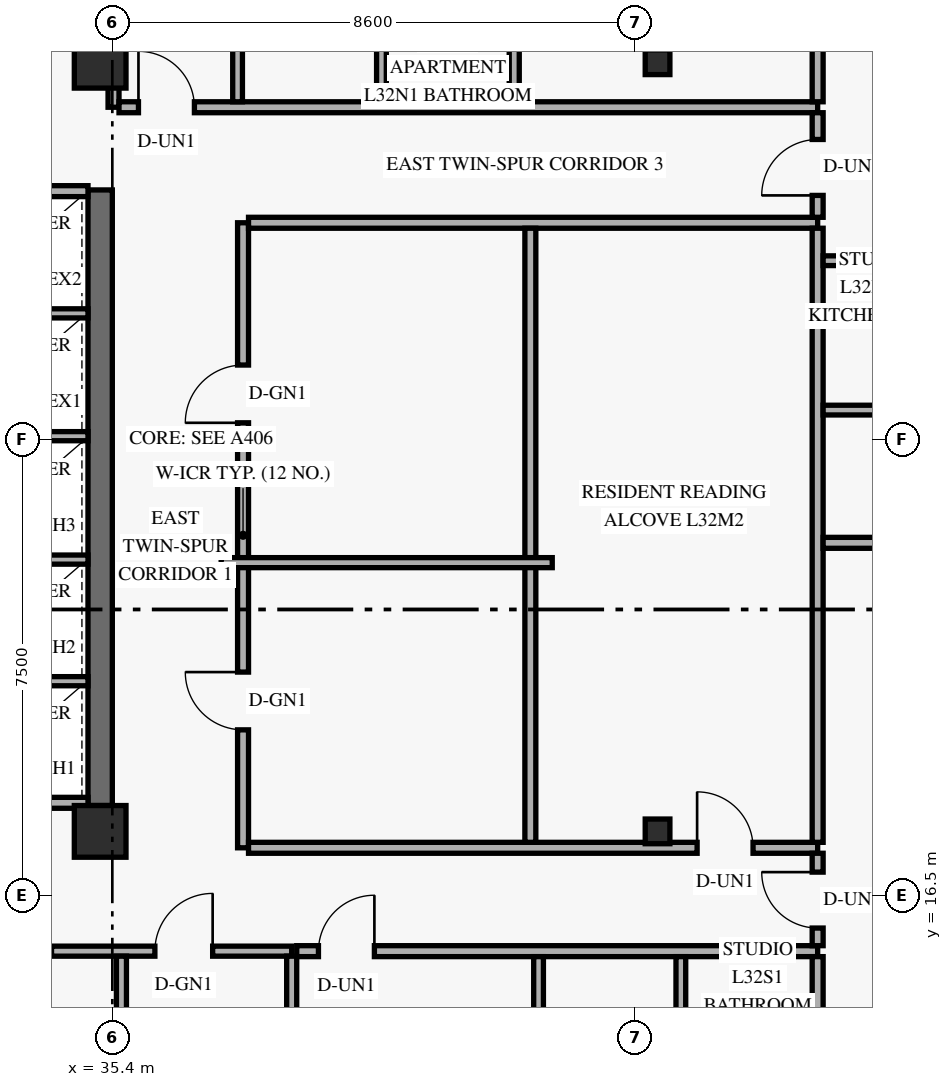
"""IFC4 building model, lengths in metres.
Left out: names, types, materials, properties, quantities, classifications, styles, units other than length and angle.
Written with IfcOpenShell. Run it as: python <this file> out.ifc"""

import sys

from ifc_helpers import new_model, si_unit, direction, frame, frame_2d, origin, origin_2d, place, context, subcontext, project, spatial, rectangle, hollow_rectangle, extrude, element, fill, save


model = new_model("IFC4")
c1 = context("Model", 3, precision=1e-05, world=origin(), true_north=direction((0.0, 1.0)))
c2 = subcontext(c1, "Body", "Model", "MODEL_VIEW")
j1 = project(units=[si_unit("LENGTHUNIT", "METRE"), si_unit("PLANEANGLEUNIT", "RADIAN")], contexts=[c1])
p1 = place(None, origin())
s1 = spatial("IfcSite", under=j1, at=p1, CompositionType="ELEMENT")
p2 = place(p1, origin())
s2 = spatial("IfcBuilding", under=s1, at=p2, CompositionType="ELEMENT")
p3 = place(p2, frame((0.0, 0.0, 124.8)))
s3 = spatial("IfcBuildingStorey", under=s2, at=p3, CompositionType="ELEMENT", Elevation=124.8)
p4 = place(p3, frame((35.2, 17.975, 0.0), z_axis=(0.0, 0.0, 1.0), x_axis=(0.0, 1.0, 0.0)))
e1 = element("IfcWall", 1, at=p4, inside=s3, PredefinedType="SHEAR", context=c2, shape_type="SweptSolid", body=[
    extrude(rectangle(XDim=10.125, YDim=0.4, at=frame_2d((5.062, 0.0))), origin(), (0.0, 0.0, 1.0), 2.749),
])
for number, where, z_axis, x_axis in (
    (2, (35.2, 17.55, 0.0), (0.0, 0.0, 1.0), (1.0, 0.0, 0.0)),
    (3, (35.2, 30.2, 0.0), (0.0, 0.0, 1.0), (1.0, 0.0, 0.0)),
):
    element("IfcColumn", number, at=place(p3, frame(where, z_axis=z_axis, x_axis=x_axis)), inside=s3, PredefinedType="COLUMN", context=c2, shape_type="SweptSolid", body=[
        extrude(rectangle(XDim=0.85, YDim=0.85, at=origin_2d()), origin(), (0.0, 0.0, 1.0), 3.6),
    ])
for number, where, z_axis, x_axis in (
    (4, (44.304, 17.55, 0.0), (0.035, 0.0, 0.999), (0.0, 1.0, 0.0)),
    (5, (44.304, 30.2, 0.0), (0.035, 0.0, 0.999), (0.0, 1.0, 0.0)),
):
    element("IfcColumn", number, at=place(p3, frame(where, z_axis=z_axis, x_axis=x_axis)), inside=s3, PredefinedType="COLUMN", context=c2, shape_type="SweptSolid", body=[
        extrude(hollow_rectangle(XDim=0.406, YDim=0.406, WallThickness=0.016, at=origin_2d()), origin(), (0.0, 0.0, 1.0), 3.602),
    ])
for number, where, z_axis, x_axis in (
    (6, (32.74, 18.02, 0.0), (0.0, 0.0, 1.0), (1.0, 0.0, 0.0)),
    (7, (32.74, 28.08, 0.0), (0.0, 0.0, 1.0), (1.0, 0.0, 0.0)),
):
    element("IfcWall", number, at=place(p3, frame(where, z_axis=z_axis, x_axis=x_axis)), inside=s3, PredefinedType="STANDARD", context=c2, shape_type="SweptSolid", body=[
        extrude(rectangle(XDim=2.26, YDim=0.18, at=frame_2d((1.13, 0.0))), origin(), (0.0, 0.0, 1.0), 3.36),
    ])
for number, where, z_axis, x_axis in (
    (8, (32.74, 20.02, 0.0), (0.0, 0.0, 1.0), (1.0, 0.0, 0.0)),
    (9, (32.74, 22.02, 0.0), (0.0, 0.0, 1.0), (1.0, 0.0, 0.0)),
    (10, (32.74, 24.05, 0.0), (0.0, 0.0, 1.0), (1.0, 0.0, 0.0)),
    (11, (32.74, 26.07, 0.0), (0.0, 0.0, 1.0), (1.0, 0.0, 0.0)),
):
    element("IfcWall", number, at=place(p3, frame(where, z_axis=z_axis, x_axis=x_axis)), inside=s3, PredefinedType="STANDARD", context=c2, shape_type="SweptSolid", body=[
        extrude(rectangle(XDim=2.26, YDim=0.15, at=frame_2d((1.13, 0.0))), origin(), (0.0, 0.0, 1.0), 3.36),
    ])
p5 = place(p3, frame((32.732, 15.58, 0.0), z_axis=(0.0, 0.0, 1.0), x_axis=(1.0, 0.0, 0.0)))
e12 = element("IfcWall", 12, at=p5, inside=s3, PredefinedType="PARTITIONING", context=c2, shape_type="SweptSolid", body=[
    extrude(rectangle(XDim=5.618, YDim=0.165, at=frame_2d((2.809, 0.0))), origin(), (0.0, 0.0, 1.0), 2.731),
])
p6 = place(p5, frame((0.768, 0.0, 0.0)))
e13 = element("IfcOpeningElement", 13, at=p6, cuts=e12, PredefinedType="OPENING", context=c2, shape_type="SweptSolid", body=[
    extrude(rectangle(XDim=0.9, YDim=2.1, at=frame_2d((0.45, 1.05))), frame((0.0, 0.093, 0.0), z_axis=(0.0, -1.0, 0.0), x_axis=(1.0, 0.0, 0.0)), (0.0, 0.0, 1.0), 0.185),
])
p7 = place(p5, frame((3.367, 0.0, 0.0)))
e14 = element("IfcOpeningElement", 14, at=p7, cuts=e12, PredefinedType="OPENING", context=c2, shape_type="SweptSolid", body=[
    extrude(rectangle(XDim=0.95, YDim=2.15, at=frame_2d((0.475, 1.075))), frame((0.0, 0.093, 0.0), z_axis=(0.0, -1.0, 0.0), x_axis=(1.0, 0.0, 0.0)), (0.0, 0.0, 1.0), 0.185),
])
p8 = place(p3, frame((38.35, 9.25, 0.0), z_axis=(0.0, 0.0, 1.0), x_axis=(0.0, 1.0, 0.0)))
e15 = element("IfcWall", 15, at=p8, inside=s3, PredefinedType="PARTITIONING", context=c2, shape_type="SweptSolid", body=[
    extrude(rectangle(XDim=6.248, YDim=0.165, at=frame_2d((3.124, 0.0))), origin(), (0.0, 0.0, 1.0), 2.731),
])
p9 = place(p3, frame((35.55, 9.5, 0.0), z_axis=(0.0, 0.0, 1.0), x_axis=(0.0, 1.0, 0.0)))
e16 = element("IfcWall", 16, at=p9, inside=s3, PredefinedType="PARTITIONING", context=c2, shape_type="SweptSolid", body=[
    extrude(rectangle(XDim=5.998, YDim=0.165, at=frame_2d((2.999, 0.0))), origin(), (0.0, 0.0, 1.0), 2.988),
])
p10 = place(p3, frame((37.55, 17.28, 0.0), z_axis=(0.0, 0.0, 1.0), x_axis=(0.0, 1.0, 0.0)))
e17 = element("IfcWall", 17, at=p10, inside=s3, PredefinedType="STANDARD", context=c2, shape_type="SweptSolid", body=[
    extrude(rectangle(XDim=10.28, YDim=0.18, at=frame_2d((5.14, 0.0))), origin(), (0.0, 0.0, 1.0), 2.731),
])
p11 = place(p10, frame((1.94, 0.0, 0.0)))
e18 = element("IfcOpeningElement", 18, at=p11, cuts=e17, PredefinedType="OPENING", context=c2, shape_type="SweptSolid", body=[
    extrude(rectangle(XDim=0.95, YDim=2.15, at=frame_2d((0.475, 1.075))), frame((0.0, 0.1, 0.0), z_axis=(0.0, -1.0, 0.0), x_axis=(1.0, 0.0, 0.0)), (0.0, 0.0, 1.0), 0.2),
])
p12 = place(p10, frame((6.99, 0.0, 0.0)))
e19 = element("IfcOpeningElement", 19, at=p12, cuts=e17, PredefinedType="OPENING", context=c2, shape_type="SweptSolid", body=[
    extrude(rectangle(XDim=0.95, YDim=2.15, at=frame_2d((0.475, 1.075))), frame((0.0, 0.1, 0.0), z_axis=(0.0, -1.0, 0.0), x_axis=(1.0, 0.0, 0.0)), (0.0, 0.0, 1.0), 0.2),
])
p13 = place(p3, frame((38.433, 15.58, 0.0), z_axis=(0.0, 0.0, 1.0), x_axis=(1.0, 0.0, 0.0)))
e20 = element("IfcWall", 20, at=p13, inside=s3, PredefinedType="STANDARD", context=c2, shape_type="SweptSolid", body=[
    extrude(rectangle(XDim=8.567, YDim=0.18, at=frame_2d((4.284, 0.0))), origin(), (0.0, 0.0, 1.0), 2.731),
])
p14 = place(p13, frame((0.357, 0.0, 0.0)))
e21 = element("IfcOpeningElement", 21, at=p14, cuts=e20, PredefinedType="OPENING", context=c2, shape_type="SweptSolid", body=[
    extrude(rectangle(XDim=0.92, YDim=2.15, at=frame_2d((0.46, 1.075))), frame((0.0, 0.1, 0.0), z_axis=(0.0, -1.0, 0.0), x_axis=(1.0, 0.0, 0.0)), (0.0, 0.0, 1.0), 0.2),
])
p15 = place(p3, frame((37.64, 17.28, 0.0), z_axis=(0.0, 0.0, 1.0), x_axis=(1.0, 0.0, 0.0)))
e22 = element("IfcWall", 22, at=p15, inside=s3, PredefinedType="STANDARD", context=c2, shape_type="SweptSolid", body=[
    extrude(rectangle(XDim=9.36, YDim=0.18, at=frame_2d((4.68, 0.0))), origin(), (0.0, 0.0, 1.0), 2.731),
])
p16 = place(p15, frame((7.377, 0.0, 0.0)))
e23 = element("IfcOpeningElement", 23, at=p16, cuts=e22, PredefinedType="OPENING", context=c2, shape_type="SweptSolid", body=[
    extrude(rectangle(XDim=0.92, YDim=2.15, at=frame_2d((0.46, 1.075))), frame((0.0, 0.1, 0.0), z_axis=(0.0, -1.0, 0.0), x_axis=(1.0, 0.0, 0.0)), (0.0, 0.0, 1.0), 0.2),
])
p17 = place(p3, frame((37.64, 27.56, 0.0), z_axis=(0.0, 0.0, 1.0), x_axis=(1.0, 0.0, 0.0)))
e24 = element("IfcWall", 24, at=p17, inside=s3, PredefinedType="STANDARD", context=c2, shape_type="SweptSolid", body=[
    extrude(rectangle(XDim=9.36, YDim=0.18, at=frame_2d((4.68, 0.0))), origin(), (0.0, 0.0, 1.0), 2.731),
])
p18 = place(p3, frame((35.42, 29.46, 0.0), z_axis=(0.0, 0.0, 1.0), x_axis=(0.0, 1.0, 0.0)))
e25 = element("IfcWall", 25, at=p18, inside=s3, PredefinedType="STANDARD", context=c2, shape_type="SweptSolid", body=[
    extrude(rectangle(XDim=1.89, YDim=0.18, at=frame_2d((0.945, 0.0))), origin(), (0.0, 0.0, 1.0), 2.731),
])
p19 = place(p3, frame((35.51, 29.46, 0.0), z_axis=(0.0, 0.0, 1.0), x_axis=(1.0, 0.0, 0.0)))
e26 = element("IfcWall", 26, at=p19, inside=s3, PredefinedType="STANDARD", context=c2, shape_type="SweptSolid", body=[
    extrude(rectangle(XDim=11.49, YDim=0.18, at=frame_2d((5.745, 0.0))), origin(), (0.0, 0.0, 1.0), 2.731),
])
p20 = place(p19, frame((0.32, 0.0, 0.0)))
e27 = element("IfcOpeningElement", 27, at=p20, cuts=e26, PredefinedType="OPENING", context=c2, shape_type="SweptSolid", body=[
    extrude(rectangle(XDim=0.92, YDim=2.15, at=frame_2d((0.46, 1.075))), frame((0.0, 0.1, 0.0), z_axis=(0.0, -1.0, 0.0), x_axis=(1.0, 0.0, 0.0)), (0.0, 0.0, 1.0), 0.2),
])
p21 = place(p3, frame((42.41, 13.06, 0.0), z_axis=(0.0, 0.0, 1.0), x_axis=(0.0, 1.0, 0.0)))
e28 = element("IfcWall", 28, at=p21, inside=s3, PredefinedType="PLUMBINGWALL", context=c2, shape_type="SweptSolid", body=[
    extrude(rectangle(XDim=2.43, YDim=0.16, at=frame_2d((1.215, 0.0))), origin(), (0.0, 0.0, 1.0), 2.988),
])
p22 = place(p3, frame((44.75, 13.22, 0.0), z_axis=(0.0, 0.0, 1.0), x_axis=(0.0, 1.0, 0.0)))
e29 = element("IfcWall", 29, at=p22, inside=s3, PredefinedType="PLUMBINGWALL", context=c2, shape_type="SweptSolid", body=[
    extrude(rectangle(XDim=2.27, YDim=0.16, at=frame_2d((1.135, 0.0))), origin(), (0.0, 0.0, 1.0), 2.988),
])
p23 = place(p3, frame((42.01, 29.55, 0.0), z_axis=(0.0, 0.0, 1.0), x_axis=(0.0, 1.0, 0.0)))
e30 = element("IfcWall", 30, at=p23, inside=s3, PredefinedType="PARTITIONING", context=c2, shape_type="SweptSolid", body=[
    extrude(rectangle(XDim=15.47, YDim=0.165, at=frame_2d((7.735, 0.0))), origin(), (0.0, 0.0, 1.0), 2.731),
])
p24 = place(p23, frame((4.917, 0.0, 0.0)))
e31 = element("IfcOpeningElement", 31, at=p24, cuts=e30, PredefinedType="OPENING", context=c2, shape_type="SweptSolid", body=[
    extrude(rectangle(XDim=0.88, YDim=2.14, at=frame_2d((0.44, 1.07))), frame((0.0, 0.093, 0.0), z_axis=(0.0, -1.0, 0.0), x_axis=(1.0, 0.0, 0.0)), (0.0, 0.0, 1.0), 0.185),
])
p25 = place(p23, frame((9.255, 0.0, 0.0)))
e32 = element("IfcOpeningElement", 32, at=p25, cuts=e30, PredefinedType="OPENING", context=c2, shape_type="SweptSolid", body=[
    extrude(rectangle(XDim=0.88, YDim=2.14, at=frame_2d((0.44, 1.07))), frame((0.0, 0.093, 0.0), z_axis=(0.0, -1.0, 0.0), x_axis=(1.0, 0.0, 0.0)), (0.0, 0.0, 1.0), 0.185),
])
p26 = place(p3, frame((37.46, 29.55, 0.0), z_axis=(0.0, 0.0, 1.0), x_axis=(0.0, 1.0, 0.0)))
e33 = element("IfcWall", 33, at=p26, inside=s3, PredefinedType="PLUMBINGWALL", context=c2, shape_type="SweptSolid", body=[
    extrude(rectangle(XDim=2.625, YDim=0.16, at=frame_2d((1.312, 0.0))), origin(), (0.0, 0.0, 1.0), 2.731),
])
p27 = place(p3, frame((39.826, 29.55, 0.0), z_axis=(0.0, 0.0, 1.0), x_axis=(0.0, 1.0, 0.0)))
e34 = element("IfcWall", 34, at=p27, inside=s3, PredefinedType="PLUMBINGWALL", context=c2, shape_type="SweptSolid", body=[
    extrude(rectangle(XDim=2.465, YDim=0.16, at=frame_2d((1.232, 0.0))), origin(), (0.0, 0.0, 1.0), 2.731),
])
p28 = place(p3, frame((42.275, 17.37, 0.0), z_axis=(0.0, 0.0, 1.0), x_axis=(0.0, 1.0, 0.0)))
e35 = element("IfcWall", 35, at=p28, inside=s3, PredefinedType="PARTITIONING", context=c2, shape_type="SweptSolid", body=[
    extrude(rectangle(XDim=10.1, YDim=0.18, at=frame_2d((5.05, 0.0))), origin(), (0.0, 0.0, 1.0), 2.731),
])
p29 = place(p3, frame((37.19, 21.97, 0.0), z_axis=(0.0, 0.0, 1.0), x_axis=(1.0, 0.0, 0.0)))
e36 = element("IfcWall", 36, at=p29, inside=s3, PredefinedType="PARTITIONING", context=c2, shape_type="SweptSolid", body=[
    extrude(rectangle(XDim=5.445, YDim=0.165, at=frame_2d((2.723, 0.0))), origin(), (0.0, 0.0, 1.0), 3.36),
])
p30 = place(p3, frame((47.0, 15.67, 0.0), z_axis=(0.0, 0.0, 1.0), x_axis=(0.0, 1.0, 0.0)))
e37 = element("IfcWall", 37, at=p30, inside=s3, PredefinedType="STANDARD", context=c2, shape_type="SweptSolid", body=[
    extrude(rectangle(XDim=1.52, YDim=0.18, at=frame_2d((0.76, 0.0))), origin(), (0.0, 0.0, 1.0), 3.36),
])
p31 = place(p30, frame((0.29, 0.0, 0.0)))
e38 = element("IfcOpeningElement", 38, at=p31, cuts=e37, PredefinedType="OPENING", context=c2, shape_type="SweptSolid", body=[
    extrude(rectangle(XDim=0.92, YDim=2.15, at=frame_2d((0.46, 1.075))), frame((0.0, 0.1, 0.0), z_axis=(0.0, -1.0, 0.0), x_axis=(1.0, 0.0, 0.0)), (0.0, 0.0, 1.0), 0.2),
])
p32 = place(p3, frame((47.0, 27.65, 0.0), z_axis=(0.0, 0.0, 1.0), x_axis=(0.0, 1.0, 0.0)))
e39 = element("IfcWall", 39, at=p32, inside=s3, PredefinedType="STANDARD", context=c2, shape_type="SweptSolid", body=[
    extrude(rectangle(XDim=1.72, YDim=0.18, at=frame_2d((0.86, 0.0))), origin(), (0.0, 0.0, 1.0), 3.36),
])
p33 = place(p32, frame((0.36, 0.0, 0.0)))
e40 = element("IfcOpeningElement", 40, at=p33, cuts=e39, PredefinedType="OPENING", context=c2, shape_type="SweptSolid", body=[
    extrude(rectangle(XDim=0.92, YDim=2.15, at=frame_2d((0.46, 1.075))), frame((0.0, 0.1, 0.0), z_axis=(0.0, -1.0, 0.0), x_axis=(1.0, 0.0, 0.0)), (0.0, 0.0, 1.0), 0.2),
])
p34 = place(p3, frame((47.0, 2.98, 0.0), z_axis=(0.0, 0.0, 1.0), x_axis=(0.0, 1.0, 0.0)))
e41 = element("IfcWall", 41, at=p34, inside=s3, PredefinedType="PARTITIONING", context=c2, shape_type="SweptSolid", body=[
    extrude(rectangle(XDim=12.51, YDim=0.18, at=frame_2d((6.255, 0.0))), origin(), (0.0, 0.0, 1.0), 2.731),
])
p35 = place(p3, frame((47.0, 17.37, 0.0), z_axis=(0.0, 0.0, 1.0), x_axis=(0.0, 1.0, 0.0)))
e42 = element("IfcWall", 42, at=p35, inside=s3, PredefinedType="PARTITIONING", context=c2, shape_type="SweptSolid", body=[
    extrude(rectangle(XDim=10.1, YDim=0.18, at=frame_2d((5.05, 0.0))), origin(), (0.0, 0.0, 1.0), 2.731),
])
p36 = place(p3, frame((47.0, 29.55, 0.0), z_axis=(0.0, 0.0, 1.0), x_axis=(0.0, 1.0, 0.0)))
e43 = element("IfcWall", 43, at=p36, inside=s3, PredefinedType="PARTITIONING", context=c2, shape_type="SweptSolid", body=[
    extrude(rectangle(XDim=15.47, YDim=0.18, at=frame_2d((7.735, 0.0))), origin(), (0.0, 0.0, 1.0), 2.731),
])
p37 = place(p3, frame((47.09, 22.296, 0.0), z_axis=(0.0, 0.0, 1.0), x_axis=(1.0, 0.0, 0.0)))
e44 = element("IfcWall", 44, at=p37, inside=s3, PredefinedType="PARTITIONING", context=c2, shape_type="SweptSolid", body=[
    extrude(rectangle(XDim=6.23, YDim=0.18, at=frame_2d((3.115, 0.0))), origin(), (0.0, 0.0, 1.0), 2.809),
])
p38 = place(p3, frame((47.09, 26.936, 0.0), z_axis=(0.0, 0.0, 1.0), x_axis=(1.0, 0.0, 0.0)))
e45 = element("IfcWall", 45, at=p38, inside=s3, PredefinedType="PLUMBINGWALL", context=c2, shape_type="SweptSolid", body=[
    extrude(rectangle(XDim=2.606, YDim=0.16, at=frame_2d((1.303, 0.0))), origin(), (0.0, 0.0, 1.0), 3.36),
])
p39 = place(p3, frame((47.09, 24.479, 0.0), z_axis=(0.0, 0.0, 1.0), x_axis=(1.0, 0.0, 0.0)))
e46 = element("IfcWall", 46, at=p39, inside=s3, PredefinedType="PLUMBINGWALL", context=c2, shape_type="SweptSolid", body=[
    extrude(rectangle(XDim=2.446, YDim=0.16, at=frame_2d((1.223, 0.0))), origin(), (0.0, 0.0, 1.0), 3.36),
])
p40 = place(p7, origin())
e47 = element("IfcDoor", 47, at=p40, inside=s3, OperationType="SINGLE_SWING_RIGHT", PredefinedType="DOOR", context=c2, shape_type="SweptSolid", body=[
    extrude(rectangle(XDim=0.95, YDim=2.15, at=frame_2d((0.475, 1.075))), frame((0.0, 0.025, 0.0), z_axis=(0.0, -1.0, 0.0), x_axis=(1.0, 0.0, 0.0)), (0.0, 0.0, 1.0), 0.05),
])
fill(e14, e47)
p41 = place(p14, origin())
e48 = element("IfcDoor", 48, at=p41, inside=s3, OperationType="SINGLE_SWING_RIGHT", PredefinedType="DOOR", context=c2, shape_type="SweptSolid", body=[
    extrude(rectangle(XDim=0.92, YDim=2.15, at=frame_2d((0.46, 1.075))), frame((0.0, 0.025, 0.0), z_axis=(0.0, -1.0, 0.0), x_axis=(1.0, 0.0, 0.0)), (0.0, 0.0, 1.0), 0.05),
])
fill(e21, e48)
p42 = place(p20, origin())
e49 = element("IfcDoor", 49, at=p42, inside=s3, OperationType="SINGLE_SWING_LEFT", PredefinedType="DOOR", context=c2, shape_type="SweptSolid", body=[
    extrude(rectangle(XDim=0.92, YDim=2.15, at=frame_2d((0.46, 1.075))), frame((0.0, 0.025, 0.0), z_axis=(0.0, -1.0, 0.0), x_axis=(1.0, 0.0, 0.0)), (0.0, 0.0, 1.0), 0.05),
])
fill(e27, e49)
p43 = place(p11, origin())
e50 = element("IfcDoor", 50, at=p43, inside=s3, OperationType="SINGLE_SWING_RIGHT", PredefinedType="DOOR", context=c2, shape_type="SweptSolid", body=[
    extrude(rectangle(XDim=0.95, YDim=2.15, at=frame_2d((0.475, 1.075))), frame((0.0, 0.025, 0.0), z_axis=(0.0, -1.0, 0.0), x_axis=(1.0, 0.0, 0.0)), (0.0, 0.0, 1.0), 0.05),
])
fill(e18, e50)
p44 = place(p12, origin())
e51 = element("IfcDoor", 51, at=p44, inside=s3, OperationType="SINGLE_SWING_LEFT", PredefinedType="DOOR", context=c2, shape_type="SweptSolid", body=[
    extrude(rectangle(XDim=0.95, YDim=2.15, at=frame_2d((0.475, 1.075))), frame((0.0, 0.025, 0.0), z_axis=(0.0, -1.0, 0.0), x_axis=(1.0, 0.0, 0.0)), (0.0, 0.0, 1.0), 0.05),
])
fill(e19, e51)
p45 = place(p16, origin())
e52 = element("IfcDoor", 52, at=p45, inside=s3, OperationType="SINGLE_SWING_LEFT", PredefinedType="DOOR", context=c2, shape_type="SweptSolid", body=[
    extrude(rectangle(XDim=0.92, YDim=2.15, at=frame_2d((0.46, 1.075))), frame((0.0, 0.025, 0.0), z_axis=(0.0, -1.0, 0.0), x_axis=(1.0, 0.0, 0.0)), (0.0, 0.0, 1.0), 0.05),
])
fill(e23, e52)
p46 = place(p31, origin())
e53 = element("IfcDoor", 53, at=p46, inside=s3, OperationType="SINGLE_SWING_RIGHT", PredefinedType="DOOR", context=c2, shape_type="SweptSolid", body=[
    extrude(rectangle(XDim=0.92, YDim=2.15, at=frame_2d((0.46, 1.075))), frame((0.0, 0.025, 0.0), z_axis=(0.0, -1.0, 0.0), x_axis=(1.0, 0.0, 0.0)), (0.0, 0.0, 1.0), 0.05),
])
fill(e38, e53)
p47 = place(p33, origin())
e54 = element("IfcDoor", 54, at=p47, inside=s3, OperationType="SINGLE_SWING_LEFT", PredefinedType="DOOR", context=c2, shape_type="SweptSolid", body=[
    extrude(rectangle(XDim=0.92, YDim=2.15, at=frame_2d((0.46, 1.075))), frame((0.0, 0.025, 0.0), z_axis=(0.0, -1.0, 0.0), x_axis=(1.0, 0.0, 0.0)), (0.0, 0.0, 1.0), 0.05),
])
fill(e40, e54)
save(model, sys.argv[1])
